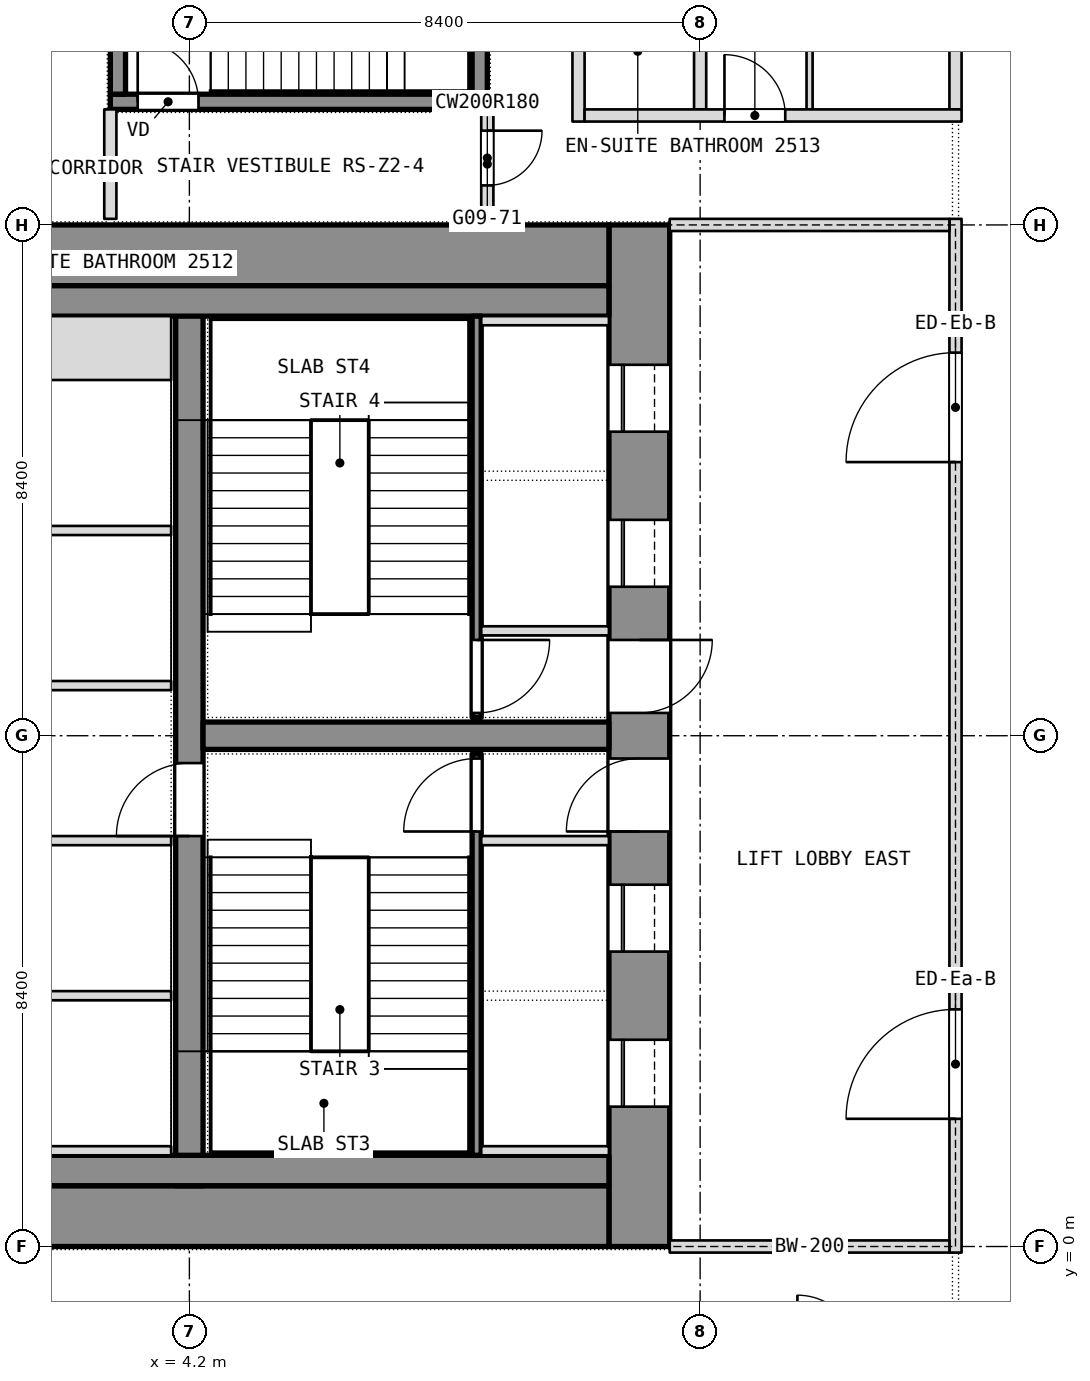
"""IFC4 building model, lengths in metres.
Left out: names, types, materials, properties, quantities, classifications, styles, units other than length and angle.
Written with IfcOpenShell. Run it as: python <this file> out.ifc"""

import sys

from ifc_helpers import new_model, si_unit, direction, frame, frame_2d, origin, place, context, subcontext, project, spatial, rectangle, extrude, element, fill, save


model = new_model("IFC4")
c1 = context("Model", 3, precision=1e-05, world=origin(), true_north=direction((0.0, 1.0)))
c2 = subcontext(c1, "Body", "Model", "MODEL_VIEW")
j1 = project(units=[si_unit("LENGTHUNIT", "METRE"), si_unit("PLANEANGLEUNIT", "RADIAN")], contexts=[c1])
p1 = place(None, origin())
s1 = spatial("IfcSite", under=j1, at=p1, CompositionType="ELEMENT")
p2 = place(p1, origin())
s2 = spatial("IfcBuilding", under=s1, at=p2, CompositionType="ELEMENT")
p3 = place(p2, frame((0.0, 0.0, 115.7)))
s3 = spatial("IfcBuildingStorey", under=s2, at=p3, CompositionType="ELEMENT", Elevation=115.7)
p4 = place(p3, frame((11.6, 0.0, 0.0), z_axis=(0.0, 0.0, 1.0), x_axis=(0.0, 1.0, 0.0)))
e1 = element("IfcWall", 1, at=p4, inside=s3, PredefinedType="SHEAR", context=c2, shape_type="SweptSolid", body=[
    extrude(rectangle(XDim=16.8, YDim=1.0, at=frame_2d((8.4, 0.0))), origin(), (0.0, 0.0, 1.0), 3.6),
])
p5 = place(p4, frame((2.3, 0.0, 0.0)))
e2 = element("IfcOpeningElement", 2, at=p5, cuts=e1, PredefinedType="OPENING", context=c2, shape_type="SweptSolid", body=[
    extrude(rectangle(XDim=1.1, YDim=2.1, at=frame_2d((0.55, 1.05))), frame((0.0, 0.5, 0.0), z_axis=(0.0, -1.0, 0.0), x_axis=(1.0, 0.0, 0.0)), (0.0, 0.0, 1.0), 1.0),
])
p6 = place(p4, frame((4.85, 0.0, 0.0)))
e3 = element("IfcOpeningElement", 3, at=p6, cuts=e1, PredefinedType="OPENING", context=c2, shape_type="SweptSolid", body=[
    extrude(rectangle(XDim=1.1, YDim=2.1, at=frame_2d((0.55, 1.05))), frame((0.0, 0.5, 0.0), z_axis=(0.0, -1.0, 0.0), x_axis=(1.0, 0.0, 0.0)), (0.0, 0.0, 1.0), 1.0),
])
p7 = place(p4, frame((6.825, 0.0, 0.0)))
e4 = element("IfcOpeningElement", 4, at=p7, cuts=e1, PredefinedType="OPENING", context=c2, shape_type="SweptSolid", body=[
    extrude(rectangle(XDim=1.2, YDim=2.1, at=frame_2d((0.6, 1.05))), frame((0.0, 0.5, 0.0), z_axis=(0.0, -1.0, 0.0), x_axis=(1.0, 0.0, 0.0)), (0.0, 0.0, 1.0), 1.0),
])
p8 = place(p4, frame((13.4, 0.0, 0.0)))
e5 = element("IfcOpeningElement", 5, at=p8, cuts=e1, PredefinedType="OPENING", context=c2, shape_type="SweptSolid", body=[
    extrude(rectangle(XDim=1.1, YDim=2.1, at=frame_2d((0.55, 1.05))), frame((0.0, 0.5, 0.0), z_axis=(0.0, -1.0, 0.0), x_axis=(1.0, 0.0, 0.0)), (0.0, 0.0, 1.0), 1.0),
])
p9 = place(p4, frame((10.85, 0.0, 0.0)))
e6 = element("IfcOpeningElement", 6, at=p9, cuts=e1, PredefinedType="OPENING", context=c2, shape_type="SweptSolid", body=[
    extrude(rectangle(XDim=1.1, YDim=2.1, at=frame_2d((0.55, 1.05))), frame((0.0, 0.5, 0.0), z_axis=(0.0, -1.0, 0.0), x_axis=(1.0, 0.0, 0.0)), (0.0, 0.0, 1.0), 1.0),
])
p10 = place(p4, frame((8.775, 0.0, 0.0)))
e7 = element("IfcOpeningElement", 7, at=p10, cuts=e1, PredefinedType="OPENING", context=c2, shape_type="SweptSolid", body=[
    extrude(rectangle(XDim=1.2, YDim=2.1, at=frame_2d((0.6, 1.05))), frame((0.0, 0.5, 0.0), z_axis=(0.0, -1.0, 0.0), x_axis=(1.0, 0.0, 0.0)), (0.0, 0.0, 1.0), 1.0),
])
for number, where, z_axis, x_axis in (
    (8, (-11.1, 0.5, 0.0), (0.0, 0.0, 1.0), (1.0, 0.0, 0.0)),
    (9, (-11.1, 16.3, 0.0), (0.0, 0.0, 1.0), (1.0, 0.0, 0.0)),
):
    element("IfcWall", number, at=place(p3, frame(where, z_axis=z_axis, x_axis=x_axis)), inside=s3, PredefinedType="SHEAR", context=c2, shape_type="SweptSolid", body=[
        extrude(rectangle(XDim=22.2, YDim=1.0, at=frame_2d((11.1, 0.0))), origin(), (0.0, 0.0, 1.0), 3.6),
    ])
p11 = place(p3, frame((4.2, 1.0, 0.0), z_axis=(0.0, 0.0, 1.0), x_axis=(0.0, 1.0, 0.0)))
e10 = element("IfcWall", 10, at=p11, inside=s3, PredefinedType="SHEAR", context=c2, shape_type="SweptSolid", body=[
    extrude(rectangle(XDim=14.8, YDim=0.45, at=frame_2d((7.4, 0.0))), origin(), (0.0, 0.0, 1.0), 3.6),
])
p12 = place(p11, frame((5.75, 0.0, 0.0)))
e11 = element("IfcOpeningElement", 11, at=p12, cuts=e10, PredefinedType="OPENING", context=c2, shape_type="SweptSolid", body=[
    extrude(rectangle(XDim=1.2, YDim=2.1, at=frame_2d((0.6, 1.05))), frame((0.0, 0.225, 0.0), z_axis=(0.0, -1.0, 0.0), x_axis=(1.0, 0.0, 0.0)), (0.0, 0.0, 1.0), 0.45),
])
p13 = place(p3, frame((4.425, 8.4, 0.0), z_axis=(0.0, 0.0, 1.0), x_axis=(1.0, 0.0, 0.0)))
e12 = element("IfcWall", 12, at=p13, inside=s3, PredefinedType="SHEAR", context=c2, shape_type="SweptSolid", body=[
    extrude(rectangle(XDim=6.675, YDim=0.45, at=frame_2d((3.337, 0.0))), origin(), (0.0, 0.0, 1.0), 3.6),
])
p14 = place(p3, frame((16.8, 18.7, 0.0), z_axis=(0.0, 0.0, 1.0), x_axis=(0.0, 1.0, 0.0)))
e13 = element("IfcWall", 13, at=p14, inside=s3, PredefinedType="PARTITIONING", context=c2, shape_type="SweptSolid", body=[
    extrude(rectangle(XDim=9.24, YDim=0.2, at=frame_2d((4.62, 0.0))), origin(), (0.0, 0.0, 1.0), 3.34),
])
p15 = place(p3, frame((14.4, 18.7, 0.0), z_axis=(0.0, 0.0, 1.0), x_axis=(0.0, 1.0, 0.0)))
e14 = element("IfcWall", 14, at=p15, inside=s3, PredefinedType="PARTITIONING", context=c2, shape_type="SweptSolid", body=[
    extrude(rectangle(XDim=4.05, YDim=0.1, at=frame_2d((2.025, 0.0))), origin(), (0.0, 0.0, 1.0), 3.34),
])
p16 = place(p3, frame((12.6, 18.7, 0.0), z_axis=(0.0, 0.0, 1.0), x_axis=(0.0, 1.0, 0.0)))
e15 = element("IfcWall", 15, at=p16, inside=s3, PredefinedType="PARTITIONING", context=c2, shape_type="SweptSolid", body=[
    extrude(rectangle(XDim=9.24, YDim=0.2, at=frame_2d((4.62, 0.0))), origin(), (0.0, 0.0, 1.0), 3.34),
])
p17 = place(p3, frame((10.6, 18.5, 0.0), z_axis=(0.0, 0.0, 1.0), x_axis=(0.0, 1.0, 0.0)))
e16 = element("IfcWall", 16, at=p17, inside=s3, PredefinedType="PARTITIONING", context=c2, shape_type="SweptSolid", body=[
    extrude(rectangle(XDim=5.0, YDim=0.2, at=frame_2d((2.5, 0.0))), origin(), (0.0, 0.0, 1.0), 3.34),
])
p18 = place(p17, frame((3.6, 0.0, 0.0)))
e17 = element("IfcOpeningElement", 17, at=p18, cuts=e16, PredefinedType="OPENING", context=c2, shape_type="SweptSolid", body=[
    extrude(rectangle(XDim=1.0, YDim=2.1, at=frame_2d((0.5, 1.05))), frame((0.0, 0.1, 0.0), z_axis=(0.0, -1.0, 0.0), x_axis=(1.0, 0.0, 0.0)), (0.0, 0.0, 1.0), 0.2),
])
p19 = place(p3, frame((9.1, 16.9, 0.0), z_axis=(0.0, 0.0, 1.0), x_axis=(0.0, 1.0, 0.0)))
e18 = element("IfcWall", 18, at=p19, inside=s3, PredefinedType="PARTITIONING", context=c2, shape_type="SweptSolid", body=[
    extrude(rectangle(XDim=1.8, YDim=0.2, at=frame_2d((0.9, 0.0))), origin(), (0.0, 0.0, 1.0), 3.34),
])
p20 = place(p19, frame((0.55, 0.0, 0.0)))
e19 = element("IfcOpeningElement", 19, at=p20, cuts=e18, PredefinedType="OPENING", context=c2, shape_type="SweptSolid", body=[
    extrude(rectangle(XDim=0.9, YDim=2.1, at=frame_2d((0.45, 1.05))), frame((0.0, 0.1, 0.0), z_axis=(0.0, -1.0, 0.0), x_axis=(1.0, 0.0, 0.0)), (0.0, 0.0, 1.0), 0.2),
])
p21 = place(p3, frame((2.9, 16.9, 0.0), z_axis=(0.0, 0.0, 1.0), x_axis=(0.0, 1.0, 0.0)))
e20 = element("IfcWall", 20, at=p21, inside=s3, PredefinedType="PARTITIONING", context=c2, shape_type="SweptSolid", body=[
    extrude(rectangle(XDim=1.8, YDim=0.2, at=frame_2d((0.9, 0.0))), origin(), (0.0, 0.0, 1.0), 3.34),
])
p22 = place(p3, frame((10.7, 18.6, 0.0), z_axis=(0.0, 0.0, 1.0), x_axis=(1.0, 0.0, 0.0)))
e21 = element("IfcWall", 21, at=p22, inside=s3, PredefinedType="PARTITIONING", context=c2, shape_type="SweptSolid", body=[
    extrude(rectangle(XDim=6.2, YDim=0.2, at=frame_2d((3.1, 0.0))), origin(), (0.0, 0.0, 1.0), 3.34),
])
p23 = place(p22, frame((2.3, 0.0, 0.0)))
e22 = element("IfcOpeningElement", 22, at=p23, cuts=e21, PredefinedType="OPENING", context=c2, shape_type="SweptSolid", body=[
    extrude(rectangle(XDim=1.0, YDim=2.1, at=frame_2d((0.5, 1.05))), frame((0.0, 0.1, 0.0), z_axis=(0.0, -1.0, 0.0), x_axis=(1.0, 0.0, 0.0)), (0.0, 0.0, 1.0), 0.2),
])
for number, where, z_axis, x_axis in (
    (23, (-11.1, 1.25, 0.0), (0.0, 0.0, 1.0), (1.0, 0.0, 0.0)),
    (24, (-11.1, 15.55, 0.0), (0.0, 0.0, 1.0), (1.0, 0.0, 0.0)),
):
    element("IfcWall", number, at=place(p3, frame(where, z_axis=z_axis, x_axis=x_axis)), inside=s3, PredefinedType="PARTITIONING", context=c2, shape_type="SweptSolid", body=[
        extrude(rectangle(XDim=22.2, YDim=0.5, at=frame_2d((11.1, 0.0))), origin(), (0.0, 0.0, 1.0), 3.34),
    ])
p24 = place(p3, frame((8.925, 1.5, 0.0), z_axis=(0.0, 0.0, 1.0), x_axis=(0.0, 1.0, 0.0)))
e25 = element("IfcWall", 25, at=p24, inside=s3, PredefinedType="SHEAR", context=c2, shape_type="SweptSolid", body=[
    extrude(rectangle(XDim=6.6, YDim=0.15, at=frame_2d((3.3, 0.0))), origin(), (0.0, 0.0, 1.0), 3.34),
])
p25 = place(p24, frame((5.325, 0.0, 0.0)))
e26 = element("IfcOpeningElement", 26, at=p25, cuts=e25, PredefinedType="OPENING", context=c2, shape_type="SweptSolid", body=[
    extrude(rectangle(XDim=1.2, YDim=2.1, at=frame_2d((0.6, 1.05))), frame((0.0, 0.075, 0.0), z_axis=(0.0, -1.0, 0.0), x_axis=(1.0, 0.0, 0.0)), (0.0, 0.0, 1.0), 0.15),
])
for number, where, z_axis, x_axis in (
    (27, (9.0, 6.675, 0.0), (0.0, 0.0, 1.0), (1.0, 0.0, 0.0)),
    (28, (9.0, 1.575, 0.0), (0.0, 0.0, 1.0), (1.0, 0.0, 0.0)),
):
    element("IfcWall", number, at=place(p3, frame(where, z_axis=z_axis, x_axis=x_axis)), inside=s3, PredefinedType="SHEAR", context=c2, shape_type="SweptSolid", body=[
        extrude(rectangle(XDim=2.1, YDim=0.15, at=frame_2d((1.05, 0.0))), origin(), (0.0, 0.0, 1.0), 3.6),
    ])
p26 = place(p3, frame((8.925, 8.7, 0.0), z_axis=(0.0, 0.0, 1.0), x_axis=(0.0, 1.0, 0.0)))
e29 = element("IfcWall", 29, at=p26, inside=s3, PredefinedType="SHEAR", context=c2, shape_type="SweptSolid", body=[
    extrude(rectangle(XDim=6.6, YDim=0.15, at=frame_2d((3.3, 0.0))), origin(), (0.0, 0.0, 1.0), 3.34),
])
p27 = place(p26, frame((0.075, 0.0, 0.0)))
e30 = element("IfcOpeningElement", 30, at=p27, cuts=e29, PredefinedType="OPENING", context=c2, shape_type="SweptSolid", body=[
    extrude(rectangle(XDim=1.2, YDim=2.1, at=frame_2d((0.6, 1.05))), frame((0.0, 0.075, 0.0), z_axis=(0.0, -1.0, 0.0), x_axis=(1.0, 0.0, 0.0)), (0.0, 0.0, 1.0), 0.15),
])
for number, where, z_axis, x_axis in (
    (31, (9.0, 10.125, 0.0), (0.0, 0.0, 1.0), (1.0, 0.0, 0.0)),
    (32, (9.0, 15.225, 0.0), (0.0, 0.0, 1.0), (1.0, 0.0, 0.0)),
):
    element("IfcWall", number, at=place(p3, frame(where, z_axis=z_axis, x_axis=x_axis)), inside=s3, PredefinedType="SHEAR", context=c2, shape_type="SweptSolid", body=[
        extrude(rectangle(XDim=2.1, YDim=0.15, at=frame_2d((1.05, 0.0))), origin(), (0.0, 0.0, 1.0), 3.6),
    ])
p28 = place(p3, frame((-3.9, 4.125, 0.0), z_axis=(0.0, 0.0, 1.0), x_axis=(1.0, 0.0, 0.0)))
e33 = element("IfcWall", 33, at=p28, inside=s3, PredefinedType="PARTITIONING", context=c2, shape_type="SweptSolid", body=[
    extrude(rectangle(XDim=7.8, YDim=0.15, at=frame_2d((3.9, 0.0))), origin(), (0.0, 0.0, 1.0), 3.34),
])
p29 = place(p28, frame((3.75, 0.0, 0.0)))
e34 = element("IfcOpeningElement", 34, at=p29, cuts=e33, PredefinedType="OPENING", context=c2, shape_type="SweptSolid", body=[
    extrude(rectangle(XDim=1.2, YDim=2.1, at=frame_2d((0.6, 1.05))), frame((0.0, 0.075, 0.0), z_axis=(0.0, -1.0, 0.0), x_axis=(1.0, 0.0, 0.0)), (0.0, 0.0, 1.0), 0.15),
])
p30 = place(p3, frame((-3.9, 11.775, 0.0), z_axis=(0.0, 0.0, 1.0), x_axis=(1.0, 0.0, 0.0)))
e35 = element("IfcWall", 35, at=p30, inside=s3, PredefinedType="PARTITIONING", context=c2, shape_type="SweptSolid", body=[
    extrude(rectangle(XDim=7.8, YDim=0.15, at=frame_2d((3.9, 0.0))), origin(), (0.0, 0.0, 1.0), 3.34),
])
p31 = place(p30, frame((3.3, 0.0, 0.0)))
e36 = element("IfcOpeningElement", 36, at=p31, cuts=e35, PredefinedType="OPENING", context=c2, shape_type="SweptSolid", body=[
    extrude(rectangle(XDim=1.2, YDim=2.1, at=frame_2d((0.6, 1.05))), frame((0.0, 0.075, 0.0), z_axis=(0.0, -1.0, 0.0), x_axis=(1.0, 0.0, 0.0)), (0.0, 0.0, 1.0), 0.15),
])
p32 = place(p3, frame((1.65, 1.575, 0.0), z_axis=(0.0, 0.0, 1.0), x_axis=(1.0, 0.0, 0.0)))
e37 = element("IfcWall", 37, at=p32, inside=s3, PredefinedType="SHEAR", context=c2, shape_type="SweptSolid", body=[
    extrude(rectangle(XDim=2.25, YDim=0.15, at=frame_2d((1.125, 0.0))), origin(), (0.0, 0.0, 1.0), 3.6),
])
p33 = place(p3, frame((1.65, 14.775, 0.0), z_axis=(0.0, 0.0, 1.0), x_axis=(1.0, 0.0, 0.0)))
e38 = element("IfcWall", 38, at=p33, inside=s3, PredefinedType="SHEAR", context=c2, shape_type="SweptSolid", body=[
    extrude(rectangle(XDim=2.25, YDim=1.05, at=frame_2d((1.125, 0.0))), origin(), (0.0, 0.0, 1.0), 3.6),
])
for number, where, z_axis, x_axis in (
    (39, (1.65, 6.675, 0.0), (0.0, 0.0, 1.0), (1.0, 0.0, 0.0)),
    (40, (1.65, 9.225, 0.0), (0.0, 0.0, 1.0), (1.0, 0.0, 0.0)),
):
    element("IfcWall", number, at=place(p3, frame(where, z_axis=z_axis, x_axis=x_axis)), inside=s3, PredefinedType="SHEAR", context=c2, shape_type="SweptSolid", body=[
        extrude(rectangle(XDim=2.25, YDim=0.15, at=frame_2d((1.125, 0.0))), origin(), (0.0, 0.0, 1.0), 3.6),
    ])
p34 = place(p3, frame((16.8, -0.1, 0.0), z_axis=(0.0, 0.0, 1.0), x_axis=(0.0, 1.0, 0.0)))
e41 = element("IfcWall", 41, at=p34, inside=s3, PredefinedType="PARTITIONING", context=c2, shape_type="SweptSolid", body=[
    extrude(rectangle(XDim=17.0, YDim=0.2, at=frame_2d((8.5, 0.0))), origin(), (0.0, 0.0, 1.0), 3.34),
])
p35 = place(p34, frame((2.2, 0.0, 0.0)))
e42 = element("IfcOpeningElement", 42, at=p35, cuts=e41, PredefinedType="OPENING", context=c2, shape_type="SweptSolid", body=[
    extrude(rectangle(XDim=1.8, YDim=2.1, at=frame_2d((0.9, 1.05))), frame((0.0, 0.1, 0.0), z_axis=(0.0, -1.0, 0.0), x_axis=(1.0, 0.0, 0.0)), (0.0, 0.0, 1.0), 0.2),
])
p36 = place(p34, frame((13.0, 0.0, 0.0)))
e43 = element("IfcOpeningElement", 43, at=p36, cuts=e41, PredefinedType="OPENING", context=c2, shape_type="SweptSolid", body=[
    extrude(rectangle(XDim=1.8, YDim=2.1, at=frame_2d((0.9, 1.05))), frame((0.0, 0.1, 0.0), z_axis=(0.0, -1.0, 0.0), x_axis=(1.0, 0.0, 0.0)), (0.0, 0.0, 1.0), 0.2),
])
for number, where, z_axis, x_axis in (
    (44, (12.1, 0.0, 0.0), (0.0, 0.0, 1.0), (1.0, 0.0, 0.0)),
    (45, (12.1, 16.8, 0.0), (0.0, 0.0, 1.0), (1.0, 0.0, 0.0)),
):
    element("IfcWall", number, at=place(p3, frame(where, z_axis=z_axis, x_axis=x_axis)), inside=s3, PredefinedType="PARTITIONING", context=c2, shape_type="SweptSolid", body=[
        extrude(rectangle(XDim=4.6, YDim=0.2, at=frame_2d((2.3, 0.0))), origin(), (0.0, 0.0, 1.0), 2.89),
    ])
p37 = place(p3, frame((2.9, 18.825, 0.1), z_axis=(0.0, 0.0, 1.0), x_axis=(1.0, 0.0, 0.0)))
e46 = element("IfcWall", 46, at=p37, inside=s3, PredefinedType="SHEAR", context=c2, shape_type="SweptSolid", body=[
    extrude(rectangle(XDim=6.2, YDim=0.25, at=frame_2d((3.1, 0.0))), origin(), (0.0, 0.0, 1.0), 3.6),
])
p38 = place(p37, frame((0.45, 0.0, 0.0)))
e47 = element("IfcOpeningElement", 47, at=p38, cuts=e46, PredefinedType="OPENING", context=c2, shape_type="SweptSolid", body=[
    extrude(rectangle(XDim=1.0, YDim=2.1, at=frame_2d((0.5, 1.05))), frame((0.0, 0.125, 0.0), z_axis=(0.0, -1.0, 0.0), x_axis=(1.0, 0.0, 0.0)), (0.0, 0.0, 1.0), 0.25),
])
for number, where, z_axis, x_axis in (
    (48, (3.025, 18.95, 0.1), (0.0, 0.0, 1.0), (0.0, 1.0, 0.0)),
    (49, (8.975, 18.95, 0.1), (0.0, 0.0, 1.0), (0.0, 1.0, 0.0)),
):
    element("IfcWall", number, at=place(p3, frame(where, z_axis=z_axis, x_axis=x_axis)), inside=s3, PredefinedType="SHEAR", context=c2, shape_type="SweptSolid", body=[
        extrude(rectangle(XDim=2.9, YDim=0.25, at=frame_2d((1.45, 0.0))), origin(), (0.0, 0.0, 1.0), 3.6),
    ])
p39 = place(p20, origin())
e50 = element("IfcDoor", 50, at=p39, inside=s3, OperationType="SINGLE_SWING_RIGHT", PredefinedType="DOOR", context=c2, shape_type="SweptSolid", body=[
    extrude(rectangle(XDim=0.9, YDim=2.1, at=frame_2d((0.45, 1.05))), frame((0.0, 0.025, 0.0), z_axis=(0.0, -1.0, 0.0), x_axis=(1.0, 0.0, 0.0)), (0.0, 0.0, 1.0), 0.05),
])
fill(e19, e50)
p40 = place(p23, origin())
e51 = element("IfcDoor", 51, at=p40, inside=s3, OperationType="SINGLE_SWING_RIGHT", PredefinedType="DOOR", context=c2, shape_type="SweptSolid", body=[
    extrude(rectangle(XDim=1.0, YDim=2.1, at=frame_2d((0.5, 1.05))), frame((0.0, 0.025, 0.0), z_axis=(0.0, -1.0, 0.0), x_axis=(1.0, 0.0, 0.0)), (0.0, 0.0, 1.0), 0.05),
])
fill(e22, e51)
p41 = place(p38, origin())
e52 = element("IfcDoor", 52, at=p41, inside=s3, OperationType="SINGLE_SWING_LEFT", PredefinedType="DOOR", context=c2, shape_type="SweptSolid", body=[
    extrude(rectangle(XDim=1.0, YDim=2.1, at=frame_2d((0.5, 1.05))), frame((0.0, 0.025, 0.0), z_axis=(0.0, -1.0, 0.0), x_axis=(1.0, 0.0, 0.0)), (0.0, 0.0, 1.0), 0.05),
])
fill(e47, e52)
p42 = place(p5, origin())
e53 = element("IfcDoor", 53, at=p42, inside=s3, OperationType="SLIDING_TO_LEFT", PredefinedType="DOOR", context=c2, shape_type="SweptSolid", body=[
    extrude(rectangle(XDim=1.1, YDim=2.1, at=frame_2d((0.55, 1.05))), frame((0.0, 0.025, 0.0), z_axis=(0.0, -1.0, 0.0), x_axis=(1.0, 0.0, 0.0)), (0.0, 0.0, 1.0), 0.05),
])
fill(e2, e53)
p43 = place(p6, origin())
e54 = element("IfcDoor", 54, at=p43, inside=s3, OperationType="SLIDING_TO_LEFT", PredefinedType="DOOR", context=c2, shape_type="SweptSolid", body=[
    extrude(rectangle(XDim=1.1, YDim=2.1, at=frame_2d((0.55, 1.05))), frame((0.0, 0.025, 0.0), z_axis=(0.0, -1.0, 0.0), x_axis=(1.0, 0.0, 0.0)), (0.0, 0.0, 1.0), 0.05),
])
fill(e3, e54)
p44 = place(p7, origin())
e55 = element("IfcDoor", 55, at=p44, inside=s3, OperationType="SINGLE_SWING_LEFT", PredefinedType="DOOR", context=c2, shape_type="SweptSolid", body=[
    extrude(rectangle(XDim=1.2, YDim=2.1, at=frame_2d((0.6, 1.05))), frame((0.0, 0.025, 0.0), z_axis=(0.0, -1.0, 0.0), x_axis=(1.0, 0.0, 0.0)), (0.0, 0.0, 1.0), 0.05),
])
fill(e4, e55)
p45 = place(p25, origin())
e56 = element("IfcDoor", 56, at=p45, inside=s3, OperationType="SINGLE_SWING_LEFT", PredefinedType="DOOR", context=c2, shape_type="SweptSolid", body=[
    extrude(rectangle(XDim=1.2, YDim=2.1, at=frame_2d((0.6, 1.05))), frame((0.0, 0.025, 0.0), z_axis=(0.0, -1.0, 0.0), x_axis=(1.0, 0.0, 0.0)), (0.0, 0.0, 1.0), 0.05),
])
fill(e26, e56)
p46 = place(p8, origin())
e57 = element("IfcDoor", 57, at=p46, inside=s3, OperationType="SLIDING_TO_LEFT", PredefinedType="DOOR", context=c2, shape_type="SweptSolid", body=[
    extrude(rectangle(XDim=1.1, YDim=2.1, at=frame_2d((0.55, 1.05))), frame((0.0, 0.025, 0.0), z_axis=(0.0, -1.0, 0.0), x_axis=(1.0, 0.0, 0.0)), (0.0, 0.0, 1.0), 0.05),
])
fill(e5, e57)
p47 = place(p9, origin())
e58 = element("IfcDoor", 58, at=p47, inside=s3, OperationType="SLIDING_TO_LEFT", PredefinedType="DOOR", context=c2, shape_type="SweptSolid", body=[
    extrude(rectangle(XDim=1.1, YDim=2.1, at=frame_2d((0.55, 1.05))), frame((0.0, 0.025, 0.0), z_axis=(0.0, -1.0, 0.0), x_axis=(1.0, 0.0, 0.0)), (0.0, 0.0, 1.0), 0.05),
])
fill(e6, e58)
p48 = place(p10, origin())
e59 = element("IfcDoor", 59, at=p48, inside=s3, OperationType="SINGLE_SWING_LEFT", PredefinedType="DOOR", context=c2, shape_type="SweptSolid", body=[
    extrude(rectangle(XDim=1.2, YDim=2.1, at=frame_2d((0.6, 1.05))), frame((0.0, 0.025, 0.0), z_axis=(0.0, -1.0, 0.0), x_axis=(1.0, 0.0, 0.0)), (0.0, 0.0, 1.0), 0.05),
])
fill(e7, e59)
p49 = place(p27, origin())
e60 = element("IfcDoor", 60, at=p49, inside=s3, OperationType="SINGLE_SWING_LEFT", PredefinedType="DOOR", context=c2, shape_type="SweptSolid", body=[
    extrude(rectangle(XDim=1.2, YDim=2.1, at=frame_2d((0.6, 1.05))), frame((0.0, 0.025, 0.0), z_axis=(0.0, -1.0, 0.0), x_axis=(1.0, 0.0, 0.0)), (0.0, 0.0, 1.0), 0.05),
])
fill(e30, e60)
p50 = place(p12, origin())
e61 = element("IfcDoor", 61, at=p50, inside=s3, OperationType="SINGLE_SWING_LEFT", PredefinedType="DOOR", context=c2, shape_type="SweptSolid", body=[
    extrude(rectangle(XDim=1.2, YDim=2.1, at=frame_2d((0.6, 1.05))), frame((0.0, 0.025, 0.0), z_axis=(0.0, -1.0, 0.0), x_axis=(1.0, 0.0, 0.0)), (0.0, 0.0, 1.0), 0.05),
])
fill(e11, e61)
p51 = place(p35, origin())
e62 = element("IfcDoor", 62, at=p51, inside=s3, OperationType="DOUBLE_DOOR_SINGLE_SWING", PredefinedType="DOOR", context=c2, shape_type="SweptSolid", body=[
    extrude(rectangle(XDim=1.8, YDim=2.1, at=frame_2d((0.9, 1.05))), frame((0.0, 0.025, 0.0), z_axis=(0.0, -1.0, 0.0), x_axis=(1.0, 0.0, 0.0)), (0.0, 0.0, 1.0), 0.05),
])
fill(e42, e62)
p52 = place(p36, origin())
e63 = element("IfcDoor", 63, at=p52, inside=s3, OperationType="DOUBLE_DOOR_SINGLE_SWING", PredefinedType="DOOR", context=c2, shape_type="SweptSolid", body=[
    extrude(rectangle(XDim=1.8, YDim=2.1, at=frame_2d((0.9, 1.05))), frame((0.0, 0.025, 0.0), z_axis=(0.0, -1.0, 0.0), x_axis=(1.0, 0.0, 0.0)), (0.0, 0.0, 1.0), 0.05),
])
fill(e43, e63)
save(model, sys.argv[1])
